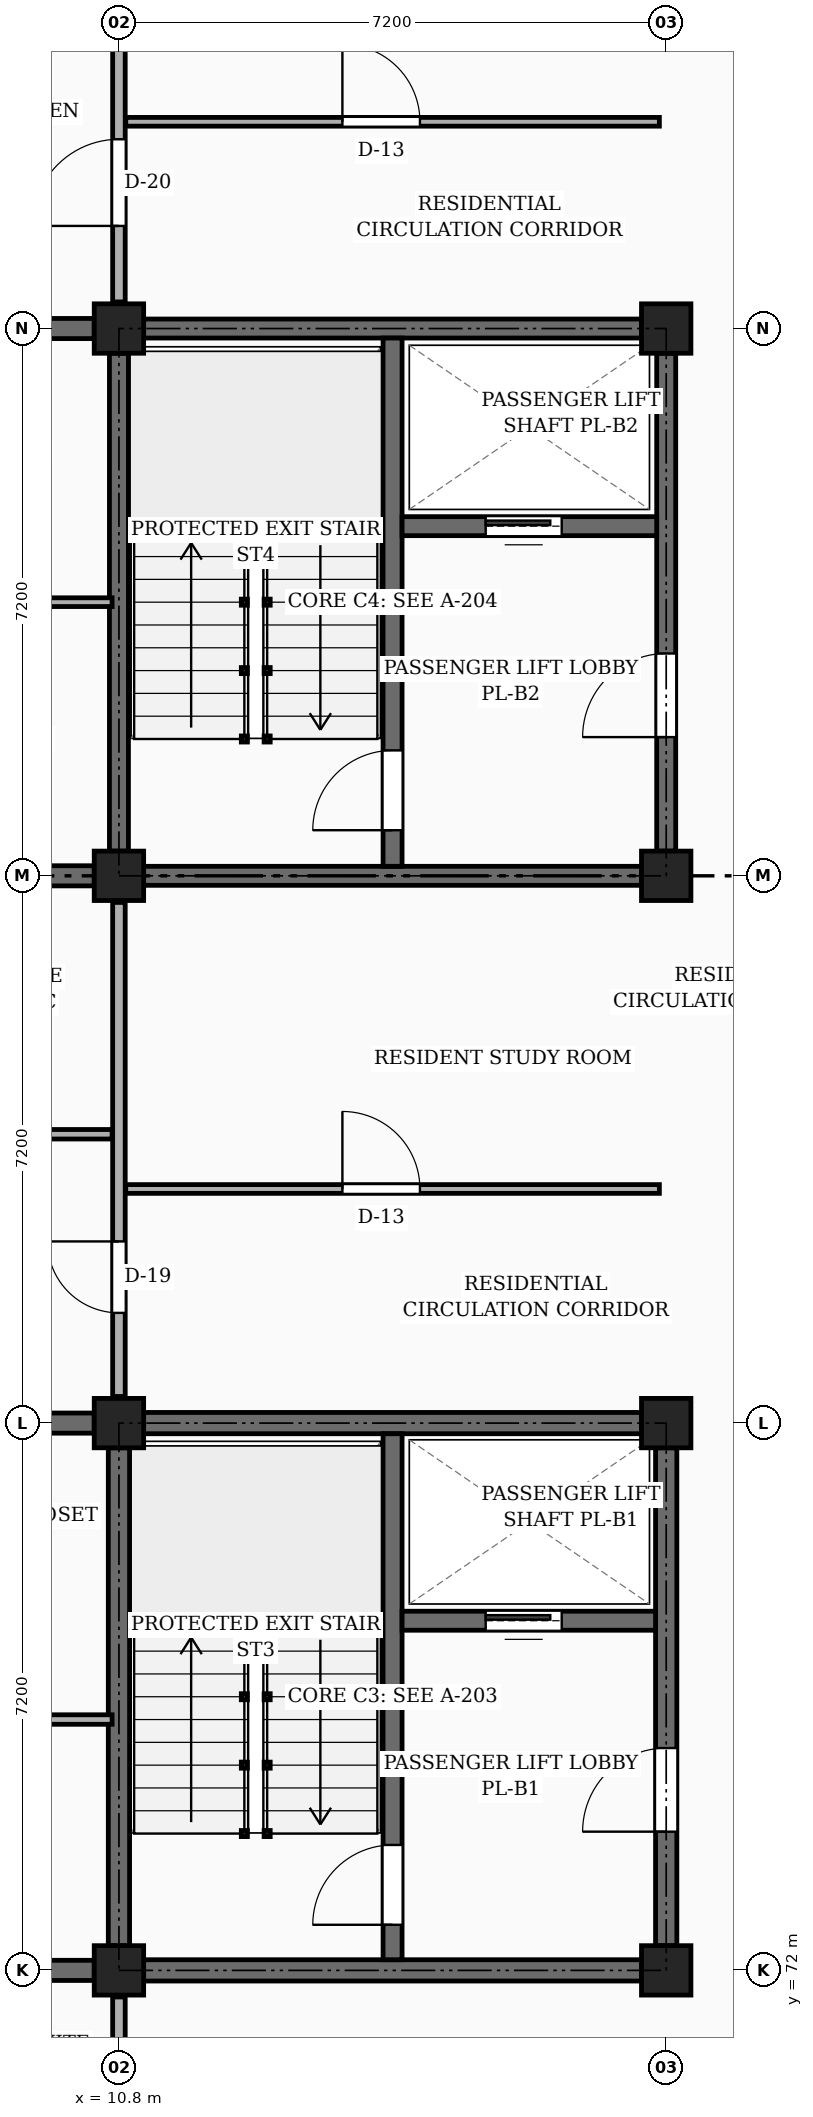
"""IFC4 building model, lengths in metres.
Left out: names, types, materials, properties, quantities, classifications, styles, units other than length and angle.
Written with IfcOpenShell. Run it as: python <this file> out.ifc"""

import sys

from ifc_helpers import new_model, si_unit, direction, frame, frame_2d, origin, origin_2d, place, context, subcontext, project, spatial, rectangle, extrude, element, fill, save


model = new_model("IFC4")
c1 = context("Model", 3, precision=1e-05, world=origin(), true_north=direction((0.0, 1.0)))
c2 = subcontext(c1, "Body", "Model", "MODEL_VIEW")
j1 = project(units=[si_unit("LENGTHUNIT", "METRE"), si_unit("PLANEANGLEUNIT", "RADIAN")], contexts=[c1])
p1 = place(None, origin())
s1 = spatial("IfcSite", under=j1, at=p1, CompositionType="ELEMENT")
p2 = place(p1, origin())
s2 = spatial("IfcBuilding", under=s1, at=p2, CompositionType="ELEMENT")
p3 = place(p2, frame((0.0, 0.0, 7.65)))
s3 = spatial("IfcBuildingStorey", under=s2, at=p3, CompositionType="ELEMENT", Elevation=7.65)
for number, where, z_axis, x_axis in (
    (1, (10.8, 72.0, 0.0), (0.0, 0.0, 1.0), (1.0, 0.0, 0.0)),
    (2, (10.8, 79.2, 0.0), (0.0, 0.0, 1.0), (1.0, 0.0, 0.0)),
    (3, (10.8, 86.4, 0.0), (0.0, 0.0, 1.0), (1.0, 0.0, 0.0)),
    (4, (10.8, 93.6, 0.0), (0.0, 0.0, 1.0), (1.0, 0.0, 0.0)),
    (5, (18.0, 72.0, 0.0), (0.0, 0.0, 1.0), (1.0, 0.0, 0.0)),
    (6, (18.0, 79.2, 0.0), (0.0, 0.0, 1.0), (1.0, 0.0, 0.0)),
    (7, (18.0, 86.4, 0.0), (0.0, 0.0, 1.0), (1.0, 0.0, 0.0)),
    (8, (18.0, 93.6, 0.0), (0.0, 0.0, 1.0), (1.0, 0.0, 0.0)),
):
    element("IfcColumn", number, at=place(p3, frame(where, z_axis=z_axis, x_axis=x_axis)), inside=s3, PredefinedType="COLUMN", context=c2, shape_type="SweptSolid", body=[
        extrude(rectangle(XDim=0.65, YDim=0.65, at=origin_2d()), origin(), (0.0, 0.0, 1.0), 3.15),
    ])
p4 = place(p3, frame((3.9, 72.0, 0.0), z_axis=(0.0, 0.0, 1.0), x_axis=(1.0, 0.0, 0.0)))
e9 = element("IfcWall", 9, at=p4, inside=s3, PredefinedType="SOLIDWALL", context=c2, shape_type="SweptSolid", body=[
    extrude(rectangle(XDim=6.575, YDim=0.265, at=frame_2d((3.288, 0.0))), origin(), (0.0, 0.0, 1.0), 2.21),
])
p5 = place(p4, frame((1.35, 0.0, 0.0)))
e10 = element("IfcOpeningElement", 10, at=p5, cuts=e9, PredefinedType="OPENING", context=c2, shape_type="SweptSolid", body=[
    extrude(rectangle(XDim=0.98, YDim=2.12, at=frame_2d((0.49, 1.06))), frame((0.0, 0.143, 0.0), z_axis=(0.0, -1.0, 0.0), x_axis=(1.0, 0.0, 0.0)), (0.0, 0.0, 1.0), 0.285),
])
p6 = place(p3, frame((3.9, 79.2, 0.0), z_axis=(0.0, 0.0, 1.0), x_axis=(1.0, 0.0, 0.0)))
e11 = element("IfcWall", 11, at=p6, inside=s3, PredefinedType="SOLIDWALL", context=c2, shape_type="SweptSolid", body=[
    extrude(rectangle(XDim=6.575, YDim=0.265, at=frame_2d((3.288, 0.0))), origin(), (0.0, 0.0, 1.0), 2.21),
])
p7 = place(p3, frame((3.9, 86.4, 0.0), z_axis=(0.0, 0.0, 1.0), x_axis=(1.0, 0.0, 0.0)))
e12 = element("IfcWall", 12, at=p7, inside=s3, PredefinedType="SOLIDWALL", context=c2, shape_type="SweptSolid", body=[
    extrude(rectangle(XDim=6.575, YDim=0.265, at=frame_2d((3.288, 0.0))), origin(), (0.0, 0.0, 1.0), 2.21),
])
p8 = place(p7, frame((1.35, 0.0, 0.0)))
e13 = element("IfcOpeningElement", 13, at=p8, cuts=e12, PredefinedType="OPENING", context=c2, shape_type="SweptSolid", body=[
    extrude(rectangle(XDim=0.98, YDim=2.12, at=frame_2d((0.49, 1.06))), frame((0.0, 0.143, 0.0), z_axis=(0.0, -1.0, 0.0), x_axis=(1.0, 0.0, 0.0)), (0.0, 0.0, 1.0), 0.285),
])
p9 = place(p3, frame((3.9, 93.6, 0.0), z_axis=(0.0, 0.0, 1.0), x_axis=(1.0, 0.0, 0.0)))
e14 = element("IfcWall", 14, at=p9, inside=s3, PredefinedType="SOLIDWALL", context=c2, shape_type="SweptSolid", body=[
    extrude(rectangle(XDim=6.575, YDim=0.265, at=frame_2d((3.288, 0.0))), origin(), (0.0, 0.0, 1.0), 2.21),
])
for number, where, z_axis, x_axis in (
    (15, (10.8, 72.325, 0.0), (0.0, 0.0, 1.0), (0.0, 1.0, 0.0)),
    (16, (11.125, 79.2, 0.0), (0.0, 0.0, 1.0), (1.0, 0.0, 0.0)),
):
    element("IfcWall", number, at=place(p3, frame(where, z_axis=z_axis, x_axis=x_axis)), inside=s3, PredefinedType="SHEAR", context=c2, shape_type="SweptSolid", body=[
        extrude(rectangle(XDim=6.55, YDim=0.28, at=frame_2d((3.275, 0.0))), origin(), (0.0, 0.0, 1.0), 2.91),
    ])
p10 = place(p3, frame((18.0, 72.325, 0.0), z_axis=(0.0, 0.0, 1.0), x_axis=(0.0, 1.0, 0.0)))
e17 = element("IfcWall", 17, at=p10, inside=s3, PredefinedType="SHEAR", context=c2, shape_type="SweptSolid", body=[
    extrude(rectangle(XDim=6.55, YDim=0.28, at=frame_2d((3.275, 0.0))), origin(), (0.0, 0.0, 1.0), 2.91),
])
p11 = place(p10, frame((1.5, 0.0, 0.0)))
e18 = element("IfcOpeningElement", 18, at=p11, cuts=e17, PredefinedType="OPENING", context=c2, shape_type="SweptSolid", body=[
    extrude(rectangle(XDim=1.1, YDim=2.15, at=frame_2d((0.55, 1.075))), frame((0.0, 0.15, 0.0), z_axis=(0.0, -1.0, 0.0), x_axis=(1.0, 0.0, 0.0)), (0.0, 0.0, 1.0), 0.3),
])
p12 = place(p3, frame((11.125, 72.0, 0.0), z_axis=(0.0, 0.0, 1.0), x_axis=(1.0, 0.0, 0.0)))
e19 = element("IfcWall", 19, at=p12, inside=s3, PredefinedType="SHEAR", context=c2, shape_type="SweptSolid", body=[
    extrude(rectangle(XDim=6.55, YDim=0.28, at=frame_2d((3.275, 0.0))), origin(), (0.0, 0.0, 1.0), 2.91),
])
p13 = place(p3, frame((14.4, 72.14, 0.0), z_axis=(0.0, 0.0, 1.0), x_axis=(0.0, 1.0, 0.0)))
e20 = element("IfcWall", 20, at=p13, inside=s3, PredefinedType="SHEAR", context=c2, shape_type="SweptSolid", body=[
    extrude(rectangle(XDim=6.92, YDim=0.25, at=frame_2d((3.46, 0.0))), origin(), (0.0, 0.0, 1.0), 2.91),
])
p14 = place(p13, frame((0.46, 0.0, 0.0)))
e21 = element("IfcOpeningElement", 21, at=p14, cuts=e20, PredefinedType="OPENING", context=c2, shape_type="SweptSolid", body=[
    extrude(rectangle(XDim=1.05, YDim=2.15, at=frame_2d((0.525, 1.075))), frame((0.0, 0.135, 0.0), z_axis=(0.0, -1.0, 0.0), x_axis=(1.0, 0.0, 0.0)), (0.0, 0.0, 1.0), 0.27),
])
p15 = place(p3, frame((14.525, 76.6, 0.0), z_axis=(0.0, 0.0, 1.0), x_axis=(1.0, 0.0, 0.0)))
e22 = element("IfcWall", 22, at=p15, inside=s3, PredefinedType="SHEAR", context=c2, shape_type="SweptSolid", body=[
    extrude(rectangle(XDim=3.335, YDim=0.25, at=frame_2d((1.667, 0.0))), origin(), (0.0, 0.0, 1.0), 2.91),
])
p16 = place(p15, frame((1.1, 0.0, 0.0)))
e23 = element("IfcOpeningElement", 23, at=p16, cuts=e22, PredefinedType="OPENING", context=c2, shape_type="SweptSolid", body=[
    extrude(rectangle(XDim=1.0, YDim=2.2, at=frame_2d((0.5, 1.1))), frame((0.0, 0.135, 0.0), z_axis=(0.0, -1.0, 0.0), x_axis=(1.0, 0.0, 0.0)), (0.0, 0.0, 1.0), 0.27),
])
p17 = place(p3, frame((10.8, 86.725, 0.0), z_axis=(0.0, 0.0, 1.0), x_axis=(0.0, 1.0, 0.0)))
e24 = element("IfcWall", 24, at=p17, inside=s3, PredefinedType="SHEAR", context=c2, shape_type="SweptSolid", body=[
    extrude(rectangle(XDim=6.55, YDim=0.25, at=frame_2d((3.275, 0.0))), origin(), (0.0, 0.0, 1.0), 2.91),
])
p18 = place(p3, frame((11.125, 93.6, 0.0), z_axis=(0.0, 0.0, 1.0), x_axis=(1.0, 0.0, 0.0)))
e25 = element("IfcWall", 25, at=p18, inside=s3, PredefinedType="SHEAR", context=c2, shape_type="SweptSolid", body=[
    extrude(rectangle(XDim=6.55, YDim=0.25, at=frame_2d((3.275, 0.0))), origin(), (0.0, 0.0, 1.0), 2.91),
])
p19 = place(p3, frame((18.0, 86.725, 0.0), z_axis=(0.0, 0.0, 1.0), x_axis=(0.0, 1.0, 0.0)))
e26 = element("IfcWall", 26, at=p19, inside=s3, PredefinedType="SHEAR", context=c2, shape_type="SweptSolid", body=[
    extrude(rectangle(XDim=6.55, YDim=0.25, at=frame_2d((3.275, 0.0))), origin(), (0.0, 0.0, 1.0), 2.91),
])
p20 = place(p19, frame((1.5, 0.0, 0.0)))
e27 = element("IfcOpeningElement", 27, at=p20, cuts=e26, PredefinedType="OPENING", context=c2, shape_type="SweptSolid", body=[
    extrude(rectangle(XDim=1.1, YDim=2.15, at=frame_2d((0.55, 1.075))), frame((0.0, 0.135, 0.0), z_axis=(0.0, -1.0, 0.0), x_axis=(1.0, 0.0, 0.0)), (0.0, 0.0, 1.0), 0.27),
])
p21 = place(p3, frame((11.125, 86.4, 0.0), z_axis=(0.0, 0.0, 1.0), x_axis=(1.0, 0.0, 0.0)))
e28 = element("IfcWall", 28, at=p21, inside=s3, PredefinedType="SHEAR", context=c2, shape_type="SweptSolid", body=[
    extrude(rectangle(XDim=6.55, YDim=0.25, at=frame_2d((3.275, 0.0))), origin(), (0.0, 0.0, 1.0), 2.91),
])
p22 = place(p3, frame((14.4, 86.525, 0.0), z_axis=(0.0, 0.0, 1.0), x_axis=(0.0, 1.0, 0.0)))
e29 = element("IfcWall", 29, at=p22, inside=s3, PredefinedType="SHEAR", context=c2, shape_type="SweptSolid", body=[
    extrude(rectangle(XDim=6.95, YDim=0.25, at=frame_2d((3.475, 0.0))), origin(), (0.0, 0.0, 1.0), 2.91),
])
p23 = place(p22, frame((0.475, 0.0, 0.0)))
e30 = element("IfcOpeningElement", 30, at=p23, cuts=e29, PredefinedType="OPENING", context=c2, shape_type="SweptSolid", body=[
    extrude(rectangle(XDim=1.05, YDim=2.15, at=frame_2d((0.525, 1.075))), frame((0.0, 0.135, 0.0), z_axis=(0.0, -1.0, 0.0), x_axis=(1.0, 0.0, 0.0)), (0.0, 0.0, 1.0), 0.27),
])
p24 = place(p3, frame((14.525, 91.0, 0.0), z_axis=(0.0, 0.0, 1.0), x_axis=(1.0, 0.0, 0.0)))
e31 = element("IfcWall", 31, at=p24, inside=s3, PredefinedType="SHEAR", context=c2, shape_type="SweptSolid", body=[
    extrude(rectangle(XDim=3.35, YDim=0.25, at=frame_2d((1.675, 0.0))), origin(), (0.0, 0.0, 1.0), 2.91),
])
p25 = place(p24, frame((1.1, 0.0, 0.0)))
e32 = element("IfcOpeningElement", 32, at=p25, cuts=e31, PredefinedType="OPENING", context=c2, shape_type="SweptSolid", body=[
    extrude(rectangle(XDim=1.0, YDim=2.2, at=frame_2d((0.5, 1.1))), frame((0.0, 0.135, 0.0), z_axis=(0.0, -1.0, 0.0), x_axis=(1.0, 0.0, 0.0)), (0.0, 0.0, 1.0), 0.27),
])
p26 = place(p3, frame((10.8, 65.15, 0.0), z_axis=(0.0, 0.0, 1.0), x_axis=(0.0, 1.0, 0.0)))
e33 = element("IfcWall", 33, at=p26, inside=s3, PredefinedType="PARTITIONING", context=c2, shape_type="SweptSolid", body=[
    extrude(rectangle(XDim=6.5, YDim=0.165, at=frame_2d((3.25, 0.0))), origin(), (0.0, 0.0, 1.0), 2.26),
])
p27 = place(p26, frame((1.0, 0.0, 0.0)))
e34 = element("IfcOpeningElement", 34, at=p27, cuts=e33, PredefinedType="OPENING", context=c2, shape_type="SweptSolid", body=[
    extrude(rectangle(XDim=1.0, YDim=2.15, at=frame_2d((0.5, 1.075))), frame((0.0, 0.093, 0.0), z_axis=(0.0, -1.0, 0.0), x_axis=(1.0, 0.0, 0.0)), (0.0, 0.0, 1.0), 0.185),
])
p28 = place(p3, frame((10.8, 79.55, 0.0), z_axis=(0.0, 0.0, 1.0), x_axis=(0.0, 1.0, 0.0)))
e35 = element("IfcWall", 35, at=p28, inside=s3, PredefinedType="PARTITIONING", context=c2, shape_type="SweptSolid", body=[
    extrude(rectangle(XDim=6.5, YDim=0.165, at=frame_2d((3.25, 0.0))), origin(), (0.0, 0.0, 1.0), 2.26),
])
p29 = place(p28, frame((1.1, 0.0, 0.0)))
e36 = element("IfcOpeningElement", 36, at=p29, cuts=e35, PredefinedType="OPENING", context=c2, shape_type="SweptSolid", body=[
    extrude(rectangle(XDim=0.94, YDim=2.12, at=frame_2d((0.47, 1.06))), frame((0.0, 0.093, 0.0), z_axis=(0.0, -1.0, 0.0), x_axis=(1.0, 0.0, 0.0)), (0.0, 0.0, 1.0), 0.185),
])
p30 = place(p3, frame((10.8, 93.95, 0.0), z_axis=(0.0, 0.0, 1.0), x_axis=(0.0, 1.0, 0.0)))
e37 = element("IfcWall", 37, at=p30, inside=s3, PredefinedType="PARTITIONING", context=c2, shape_type="SweptSolid", body=[
    extrude(rectangle(XDim=6.5, YDim=0.165, at=frame_2d((3.25, 0.0))), origin(), (0.0, 0.0, 1.0), 2.26),
])
p31 = place(p30, frame((1.0, 0.0, 0.0)))
e38 = element("IfcOpeningElement", 38, at=p31, cuts=e37, PredefinedType="OPENING", context=c2, shape_type="SweptSolid", body=[
    extrude(rectangle(XDim=1.14, YDim=2.18, at=frame_2d((0.57, 1.09))), frame((0.0, 0.093, 0.0), z_axis=(0.0, -1.0, 0.0), x_axis=(1.0, 0.0, 0.0)), (0.0, 0.0, 1.0), 0.185),
])
p32 = place(p3, frame((3.775, 75.3, 0.0), z_axis=(0.0, 0.0, 1.0), x_axis=(1.0, 0.0, 0.0)))
e39 = element("IfcWall", 39, at=p32, inside=s3, PredefinedType="PARTITIONING", context=c2, shape_type="SweptSolid", body=[
    extrude(rectangle(XDim=6.935, YDim=0.125, at=frame_2d((3.468, 0.0))), origin(), (0.0, 0.0, 1.0), 2.345),
])
p33 = place(p32, frame((1.1, 0.0, 0.0)))
e40 = element("IfcOpeningElement", 40, at=p33, cuts=e39, PredefinedType="OPENING", context=c2, shape_type="SweptSolid", body=[
    extrude(rectangle(XDim=0.87, YDim=2.05, at=frame_2d((0.435, 1.025))), frame((0.0, 0.073, 0.0), z_axis=(0.0, -1.0, 0.0), x_axis=(1.0, 0.0, 0.0)), (0.0, 0.0, 1.0), 0.145),
])
p34 = place(p32, frame((4.5, 0.0, 0.0)))
e41 = element("IfcOpeningElement", 41, at=p34, cuts=e39, PredefinedType="OPENING", context=c2, shape_type="SweptSolid", body=[
    extrude(rectangle(XDim=0.88, YDim=2.08, at=frame_2d((0.44, 1.04))), frame((0.0, 0.073, 0.0), z_axis=(0.0, -1.0, 0.0), x_axis=(1.0, 0.0, 0.0)), (0.0, 0.0, 1.0), 0.145),
])
p35 = place(p3, frame((10.89, 82.28, 0.0), z_axis=(0.0, 0.0, 1.0), x_axis=(1.0, 0.0, 0.0)))
e42 = element("IfcWall", 42, at=p35, inside=s3, PredefinedType="PARTITIONING", context=c2, shape_type="SweptSolid", body=[
    extrude(rectangle(XDim=7.02, YDim=0.115, at=frame_2d((3.51, 0.0))), origin(), (0.0, 0.0, 1.0), 2.345),
])
p36 = place(p35, frame((2.85, 0.0, 0.0)))
e43 = element("IfcOpeningElement", 43, at=p36, cuts=e42, PredefinedType="OPENING", context=c2, shape_type="SweptSolid", body=[
    extrude(rectangle(XDim=1.02, YDim=2.15, at=frame_2d((0.51, 1.075))), frame((0.0, 0.067, 0.0), z_axis=(0.0, -1.0, 0.0), x_axis=(1.0, 0.0, 0.0)), (0.0, 0.0, 1.0), 0.135),
])
p37 = place(p3, frame((3.775, 83.0, 0.0), z_axis=(0.0, 0.0, 1.0), x_axis=(1.0, 0.0, 0.0)))
e44 = element("IfcWall", 44, at=p37, inside=s3, PredefinedType="PARTITIONING", context=c2, shape_type="SweptSolid", body=[
    extrude(rectangle(XDim=6.935, YDim=0.125, at=frame_2d((3.468, 0.0))), origin(), (0.0, 0.0, 1.0), 2.345),
])
p38 = place(p37, frame((4.6, 0.0, 0.0)))
e45 = element("IfcOpeningElement", 45, at=p38, cuts=e44, PredefinedType="OPENING", context=c2, shape_type="SweptSolid", body=[
    extrude(rectangle(XDim=0.87, YDim=2.05, at=frame_2d((0.435, 1.025))), frame((0.0, 0.073, 0.0), z_axis=(0.0, -1.0, 0.0), x_axis=(1.0, 0.0, 0.0)), (0.0, 0.0, 1.0), 0.145),
])
p39 = place(p37, frame((1.2, 0.0, 0.0)))
e46 = element("IfcOpeningElement", 46, at=p39, cuts=e44, PredefinedType="OPENING", context=c2, shape_type="SweptSolid", body=[
    extrude(rectangle(XDim=0.92, YDim=2.1, at=frame_2d((0.46, 1.05))), frame((0.0, 0.073, 0.0), z_axis=(0.0, -1.0, 0.0), x_axis=(1.0, 0.0, 0.0)), (0.0, 0.0, 1.0), 0.145),
])
p40 = place(p3, frame((3.775, 90.0, 0.0), z_axis=(0.0, 0.0, 1.0), x_axis=(1.0, 0.0, 0.0)))
e47 = element("IfcWall", 47, at=p40, inside=s3, PredefinedType="PARTITIONING", context=c2, shape_type="SweptSolid", body=[
    extrude(rectangle(XDim=6.935, YDim=0.115, at=frame_2d((3.468, 0.0))), origin(), (0.0, 0.0, 1.0), 2.345),
])
p41 = place(p40, frame((2.6, 0.0, 0.0)))
e48 = element("IfcOpeningElement", 48, at=p41, cuts=e47, PredefinedType="OPENING", context=c2, shape_type="SweptSolid", body=[
    extrude(rectangle(XDim=0.92, YDim=2.1, at=frame_2d((0.46, 1.05))), frame((0.0, 0.067, 0.0), z_axis=(0.0, -1.0, 0.0), x_axis=(1.0, 0.0, 0.0)), (0.0, 0.0, 1.0), 0.135),
])
p42 = place(p3, frame((10.89, 96.32, 0.0), z_axis=(0.0, 0.0, 1.0), x_axis=(1.0, 0.0, 0.0)))
e49 = element("IfcWall", 49, at=p42, inside=s3, PredefinedType="PARTITIONING", context=c2, shape_type="SweptSolid", body=[
    extrude(rectangle(XDim=7.02, YDim=0.115, at=frame_2d((3.51, 0.0))), origin(), (0.0, 0.0, 1.0), 2.345),
])
p43 = place(p42, frame((2.85, 0.0, 0.0)))
e50 = element("IfcOpeningElement", 50, at=p43, cuts=e49, PredefinedType="OPENING", context=c2, shape_type="SweptSolid", body=[
    extrude(rectangle(XDim=1.02, YDim=2.15, at=frame_2d((0.51, 1.075))), frame((0.0, 0.067, 0.0), z_axis=(0.0, -1.0, 0.0), x_axis=(1.0, 0.0, 0.0)), (0.0, 0.0, 1.0), 0.135),
])
p44 = place(p11, frame((1.1, 0.0, 0.0), z_axis=(0.0, 0.0, 1.0), x_axis=(-1.0, 0.0, 0.0)))
e51 = element("IfcDoor", 51, at=p44, inside=s3, OperationType="SINGLE_SWING_LEFT", PredefinedType="DOOR", context=c2, shape_type="SweptSolid", body=[
    extrude(rectangle(XDim=1.1, YDim=2.15, at=frame_2d((0.55, 1.075))), frame((0.0, 0.025, 0.0), z_axis=(0.0, -1.0, 0.0), x_axis=(1.0, 0.0, 0.0)), (0.0, 0.0, 1.0), 0.05),
])
fill(e18, e51)
p45 = place(p14, origin())
e52 = element("IfcDoor", 52, at=p45, inside=s3, OperationType="SINGLE_SWING_LEFT", PredefinedType="DOOR", context=c2, shape_type="SweptSolid", body=[
    extrude(rectangle(XDim=1.05, YDim=2.15, at=frame_2d((0.525, 1.075))), frame((0.0, 0.025, 0.0), z_axis=(0.0, -1.0, 0.0), x_axis=(1.0, 0.0, 0.0)), (0.0, 0.0, 1.0), 0.05),
])
fill(e21, e52)
p46 = place(p16, origin())
e53 = element("IfcDoor", 53, at=p46, inside=s3, OperationType="SLIDING_TO_LEFT", PredefinedType="DOOR", context=c2, shape_type="SweptSolid", body=[
    extrude(rectangle(XDim=1.0, YDim=2.2, at=frame_2d((0.5, 1.1))), frame((0.0, 0.025, 0.0), z_axis=(0.0, -1.0, 0.0), x_axis=(1.0, 0.0, 0.0)), (0.0, 0.0, 1.0), 0.05),
])
fill(e23, e53)
p47 = place(p20, frame((1.1, 0.0, 0.0), z_axis=(0.0, 0.0, 1.0), x_axis=(-1.0, 0.0, 0.0)))
e54 = element("IfcDoor", 54, at=p47, inside=s3, OperationType="SINGLE_SWING_LEFT", PredefinedType="DOOR", context=c2, shape_type="SweptSolid", body=[
    extrude(rectangle(XDim=1.1, YDim=2.15, at=frame_2d((0.55, 1.075))), frame((0.0, 0.025, 0.0), z_axis=(0.0, -1.0, 0.0), x_axis=(1.0, 0.0, 0.0)), (0.0, 0.0, 1.0), 0.05),
])
fill(e27, e54)
p48 = place(p23, origin())
e55 = element("IfcDoor", 55, at=p48, inside=s3, OperationType="SINGLE_SWING_LEFT", PredefinedType="DOOR", context=c2, shape_type="SweptSolid", body=[
    extrude(rectangle(XDim=1.05, YDim=2.15, at=frame_2d((0.525, 1.075))), frame((0.0, 0.025, 0.0), z_axis=(0.0, -1.0, 0.0), x_axis=(1.0, 0.0, 0.0)), (0.0, 0.0, 1.0), 0.05),
])
fill(e30, e55)
p49 = place(p25, origin())
e56 = element("IfcDoor", 56, at=p49, inside=s3, OperationType="SLIDING_TO_LEFT", PredefinedType="DOOR", context=c2, shape_type="SweptSolid", body=[
    extrude(rectangle(XDim=1.0, YDim=2.2, at=frame_2d((0.5, 1.1))), frame((0.0, 0.025, 0.0), z_axis=(0.0, -1.0, 0.0), x_axis=(1.0, 0.0, 0.0)), (0.0, 0.0, 1.0), 0.05),
])
fill(e32, e56)
p50 = place(p29, origin())
e57 = element("IfcDoor", 57, at=p50, inside=s3, OperationType="SINGLE_SWING_RIGHT", PredefinedType="DOOR", context=c2, shape_type="SweptSolid", body=[
    extrude(rectangle(XDim=0.94, YDim=2.12, at=frame_2d((0.47, 1.06))), frame((0.0, 0.025, 0.0), z_axis=(0.0, -1.0, 0.0), x_axis=(1.0, 0.0, 0.0)), (0.0, 0.0, 1.0), 0.05),
])
fill(e36, e57)
p51 = place(p31, origin())
e58 = element("IfcDoor", 58, at=p51, inside=s3, OperationType="SINGLE_SWING_LEFT", PredefinedType="DOOR", context=c2, shape_type="SweptSolid", body=[
    extrude(rectangle(XDim=1.14, YDim=2.18, at=frame_2d((0.57, 1.09))), frame((0.0, 0.025, 0.0), z_axis=(0.0, -1.0, 0.0), x_axis=(1.0, 0.0, 0.0)), (0.0, 0.0, 1.0), 0.05),
])
fill(e38, e58)
p52 = place(p36, origin())
e59 = element("IfcDoor", 59, at=p52, inside=s3, OperationType="SINGLE_SWING_LEFT", PredefinedType="DOOR", context=c2, shape_type="SweptSolid", body=[
    extrude(rectangle(XDim=1.02, YDim=2.15, at=frame_2d((0.51, 1.075))), frame((0.0, 0.025, 0.0), z_axis=(0.0, -1.0, 0.0), x_axis=(1.0, 0.0, 0.0)), (0.0, 0.0, 1.0), 0.05),
])
fill(e43, e59)
p53 = place(p43, origin())
e60 = element("IfcDoor", 60, at=p53, inside=s3, OperationType="SINGLE_SWING_LEFT", PredefinedType="DOOR", context=c2, shape_type="SweptSolid", body=[
    extrude(rectangle(XDim=1.02, YDim=2.15, at=frame_2d((0.51, 1.075))), frame((0.0, 0.025, 0.0), z_axis=(0.0, -1.0, 0.0), x_axis=(1.0, 0.0, 0.0)), (0.0, 0.0, 1.0), 0.05),
])
fill(e50, e60)
save(model, sys.argv[1])
